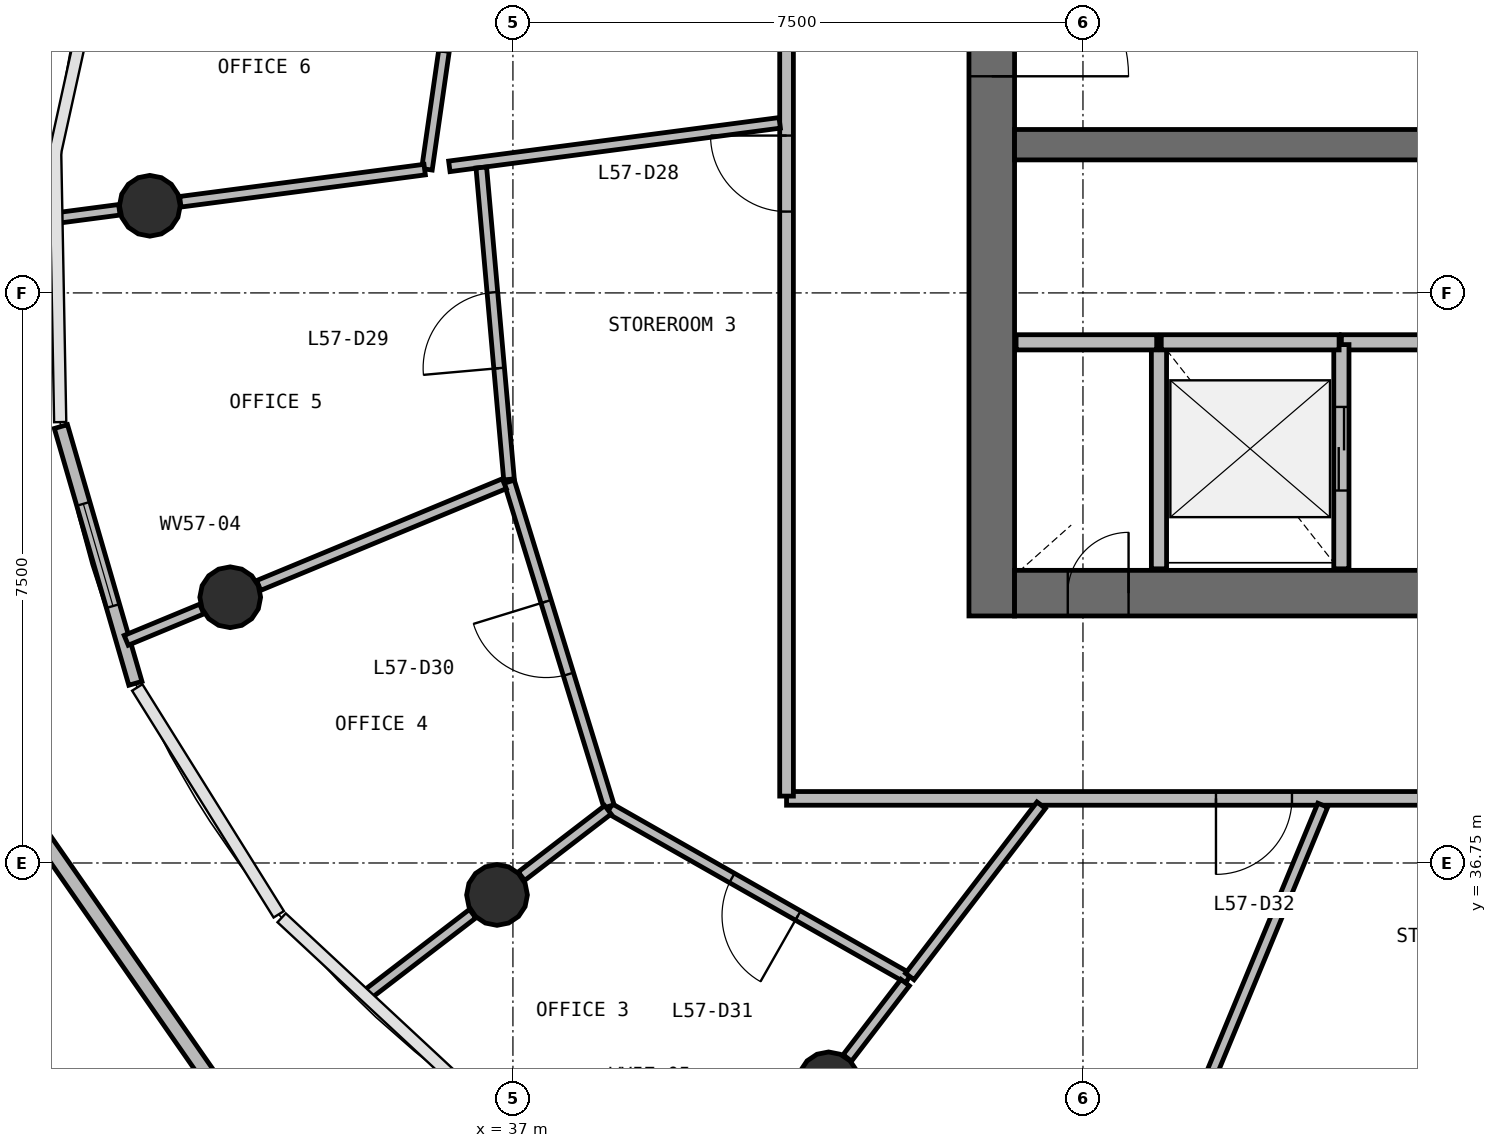
"""IFC4 building model, lengths in metres.
Left out: names, types, materials, properties, quantities, classifications, styles, units other than length and angle.
Written with IfcOpenShell. Run it as: python <this file> out.ifc"""

import sys

from ifc_helpers import new_model, si_unit, direction, frame, frame_2d, origin, origin_2d, place, context, subcontext, project, spatial, rectangle, circle, extrude, source, transform, mapped, element, fill, save


model = new_model("IFC4")
c1 = context("Model", 3, precision=1e-05, world=origin(), true_north=direction((0.0, 1.0)))
c2 = subcontext(c1, "Body", "Model", "MODEL_VIEW")
j1 = project(units=[si_unit("LENGTHUNIT", "METRE"), si_unit("PLANEANGLEUNIT", "RADIAN")], contexts=[c1])
p1 = place(None, origin())
s1 = spatial("IfcSite", under=j1, at=p1, CompositionType="ELEMENT")
p2 = place(p1, origin())
s2 = spatial("IfcBuilding", under=s1, at=p2, CompositionType="ELEMENT")
p3 = place(p2, frame((0.0, 0.0, 234.5)))
s3 = spatial("IfcBuildingStorey", under=s2, at=p3, CompositionType="ELEMENT", Elevation=234.5)
p4 = place(p3, frame((43.3, 56.0, 0.0), z_axis=(0.0, 0.0, 1.0), x_axis=(0.0, -1.0, 0.0)))
e1 = element("IfcWall", 1, at=p4, inside=s3, PredefinedType="SHEAR", context=c2, shape_type="SweptSolid", body=[
    extrude(rectangle(XDim=16.0, YDim=0.6, at=frame_2d((8.0, 0.0))), origin(), (0.0, 0.0, 1.0), 3.9),
])
p5 = place(p4, frame((7.1, 0.0, 0.0)))
e2 = element("IfcOpeningElement", 2, at=p5, cuts=e1, PredefinedType="OPENING", context=c2, shape_type="SweptSolid", body=[
    extrude(rectangle(XDim=1.8, YDim=2.1, at=frame_2d((0.9, 1.05))), frame((0.0, 0.31, 0.0), z_axis=(0.0, -1.0, 0.0), x_axis=(1.0, 0.0, 0.0)), (0.0, 0.0, 1.0), 0.62),
])
p6 = place(p3, frame((43.6, 40.3, 0.0), z_axis=(0.0, 0.0, 1.0), x_axis=(1.0, 0.0, 0.0)))
e3 = element("IfcWall", 3, at=p6, inside=s3, PredefinedType="SHEAR", context=c2, shape_type="SweptSolid", body=[
    extrude(rectangle(XDim=16.8, YDim=0.6, at=frame_2d((8.4, 0.0))), origin(), (0.0, 0.0, 1.0), 3.9),
])
p7 = place(p6, frame((10.3, 0.0, 0.0)))
e4 = element("IfcOpeningElement", 4, at=p7, cuts=e3, PredefinedType="OPENING", context=c2, shape_type="SweptSolid", body=[
    extrude(rectangle(XDim=1.2, YDim=2.1, at=frame_2d((0.6, 1.05))), frame((0.0, 0.31, 0.0), z_axis=(0.0, -1.0, 0.0), x_axis=(1.0, 0.0, 0.0)), (0.0, 0.0, 1.0), 0.62),
])
p8 = place(p6, frame((7.25, 0.0, 0.0)))
e5 = element("IfcOpeningElement", 5, at=p8, cuts=e3, PredefinedType="OPENING", context=c2, shape_type="SweptSolid", body=[
    extrude(rectangle(XDim=1.1, YDim=2.1, at=frame_2d((0.55, 1.05))), frame((0.0, 0.31, 0.0), z_axis=(0.0, -1.0, 0.0), x_axis=(1.0, 0.0, 0.0)), (0.0, 0.0, 1.0), 0.62),
])
p9 = place(p6, frame((0.7, 0.0, 0.0)))
e6 = element("IfcOpeningElement", 6, at=p9, cuts=e3, PredefinedType="OPENING", context=c2, shape_type="SweptSolid", body=[
    extrude(rectangle(XDim=0.8, YDim=2.1, at=frame_2d((0.4, 1.05))), frame((0.0, 0.31, 0.0), z_axis=(0.0, -1.0, 0.0), x_axis=(1.0, 0.0, 0.0)), (0.0, 0.0, 1.0), 0.62),
])
p10 = place(p3, frame((43.6, 46.2, 0.0), z_axis=(0.0, 0.0, 1.0), x_axis=(1.0, 0.0, 0.0)))
e7 = element("IfcWall", 7, at=p10, inside=s3, PredefinedType="SHEAR", context=c2, shape_type="SweptSolid", body=[
    extrude(rectangle(XDim=16.8, YDim=0.4, at=frame_2d((8.4, 0.0))), origin(), (0.0, 0.0, 1.0), 3.9),
])
p11 = place(p10, frame((9.8, 0.0, 0.0)))
e8 = element("IfcOpeningElement", 8, at=p11, cuts=e7, PredefinedType="OPENING", context=c2, shape_type="SweptSolid", body=[
    extrude(rectangle(XDim=1.1, YDim=2.1, at=frame_2d((0.55, 1.05))), frame((0.0, 0.21, 0.0), z_axis=(0.0, -1.0, 0.0), x_axis=(1.0, 0.0, 0.0)), (0.0, 0.0, 1.0), 0.42),
])
p12 = place(p10, frame((12.3, 0.0, 0.0)))
e9 = element("IfcOpeningElement", 9, at=p12, cuts=e7, PredefinedType="OPENING", context=c2, shape_type="SweptSolid", body=[
    extrude(rectangle(XDim=1.1, YDim=2.1, at=frame_2d((0.55, 1.05))), frame((0.0, 0.21, 0.0), z_axis=(0.0, -1.0, 0.0), x_axis=(1.0, 0.0, 0.0)), (0.0, 0.0, 1.0), 0.42),
])
p13 = place(p10, frame((14.8, 0.0, 0.0)))
e10 = element("IfcOpeningElement", 10, at=p13, cuts=e7, PredefinedType="OPENING", context=c2, shape_type="SweptSolid", body=[
    extrude(rectangle(XDim=1.1, YDim=2.1, at=frame_2d((0.55, 1.05))), frame((0.0, 0.21, 0.0), z_axis=(0.0, -1.0, 0.0), x_axis=(1.0, 0.0, 0.0)), (0.0, 0.0, 1.0), 0.42),
])
p14 = place(p10, frame((7.85, 0.0, 0.0)))
e11 = element("IfcOpeningElement", 11, at=p14, cuts=e7, PredefinedType="OPENING", context=c2, shape_type="SweptSolid", body=[
    extrude(rectangle(XDim=0.9, YDim=2.1, at=frame_2d((0.45, 1.05))), frame((0.0, 0.21, 0.0), z_axis=(0.0, -1.0, 0.0), x_axis=(1.0, 0.0, 0.0)), (0.0, 0.0, 1.0), 0.42),
])
m1 = source(origin(), c2, "Body", "SweptSolid", [
    extrude(circle(Radius=0.4, at=origin_2d()), origin(), (0.0, 0.0, 1.0), 4.22),
])
for number, where, z_axis, x_axis in (
    (12, (32.223, 45.396, -0.32), (0.0, 0.0, 1.0), (1.0, 0.0, 0.0)),
    (13, (33.281, 40.246, -0.32), (0.0, 0.0, 1.0), (1.0, 0.0, 0.0)),
    (14, (36.791, 36.329, -0.32), (0.0, 0.0, 1.0), (1.0, 0.0, 0.0)),
    (15, (41.153, 33.864, -0.32), (0.0, 0.0, 1.0), (1.0, 0.0, 0.0)),
):
    element("IfcColumn", number, at=place(p3, frame(where, z_axis=z_axis, x_axis=x_axis)), inside=s3, PredefinedType="COLUMN", context=c2, shape_type="MappedRepresentation", body=[
        mapped(m1, transform((0.0, 0.0, 0.0), scale=1.0)),
    ])
p15 = place(p3, frame((31.052, 42.492, 0.0), z_axis=(0.0, 0.0, 1.0), x_axis=(0.278669778919, -0.960386981543, 0.0)))
e16 = element("IfcWall", 16, at=p15, inside=s3, PredefinedType="STANDARD", context=c2, shape_type="SweptSolid", body=[
    extrude(rectangle(XDim=3.518, YDim=0.18, at=frame_2d((1.759, 0.0))), origin(), (0.0, 0.0, 1.0), 3.328),
])
p16 = place(p15, frame((1.059, 0.0, 0.9)))
e17 = element("IfcOpeningElement", 17, at=p16, cuts=e16, PredefinedType="OPENING", context=c2, shape_type="SweptSolid", body=[
    extrude(rectangle(XDim=1.4, YDim=2.0, at=frame_2d((0.7, 1.0))), frame((0.0, 0.1, 0.0), z_axis=(0.0, -1.0, 0.0), x_axis=(1.0, 0.0, 0.0)), (0.0, 0.0, 1.0), 0.2),
])
p17 = place(p3, frame((33.321, 33.477, 0.0), z_axis=(0.0, 0.0, 1.0), x_axis=(-0.57129566516, 0.820744334716, 0.0)))
e18 = element("IfcWall", 18, at=p17, inside=s3, PredefinedType="PARAPET", context=c2, shape_type="SweptSolid", body=[
    extrude(rectangle(XDim=5.662, YDim=0.2, at=frame_2d((2.831, 0.0))), origin(), (0.0, 0.0, 1.0), 1.1),
])
p18 = place(p3, frame((52.7, 43.6, 0.0), z_axis=(0.0, 0.0, 1.0), x_axis=(-1.0, 0.0, 0.0)))
e19 = element("IfcWall", 19, at=p18, inside=s3, PredefinedType="SOLIDWALL", context=c2, shape_type="SweptSolid", body=[
    extrude(rectangle(XDim=4.8, YDim=0.2, at=frame_2d((2.4, 0.0))), origin(), (0.0, 0.0, 1.0), 3.58),
])
p19 = place(p3, frame((45.5, 43.6, 0.0), z_axis=(0.0, 0.0, 1.0), x_axis=(0.0, -1.0, 0.0)))
e20 = element("IfcWall", 20, at=p19, inside=s3, PredefinedType="SOLIDWALL", context=c2, shape_type="SweptSolid", body=[
    extrude(rectangle(XDim=2.98, YDim=0.2, at=frame_2d((1.49, 0.0))), origin(), (0.0, 0.0, 1.0), 3.58),
])
p20 = place(p3, frame((47.9, 40.62, 0.0), z_axis=(0.0, 0.0, 1.0), x_axis=(0.0, 1.0, 0.0)))
e21 = element("IfcWall", 21, at=p20, inside=s3, PredefinedType="SOLIDWALL", context=c2, shape_type="SweptSolid", body=[
    extrude(rectangle(XDim=2.95, YDim=0.2, at=frame_2d((1.475, 0.0))), origin(), (0.0, 0.0, 1.0), 3.58),
])
p21 = place(p20, frame((1.03, 0.0, 0.0)))
e22 = element("IfcOpeningElement", 22, at=p21, cuts=e21, PredefinedType="OPENING", context=c2, shape_type="SweptSolid", body=[
    extrude(rectangle(XDim=1.1, YDim=2.1, at=frame_2d((0.55, 1.05))), frame((0.0, 0.11, 0.0), z_axis=(0.0, -1.0, 0.0), x_axis=(1.0, 0.0, 0.0)), (0.0, 0.0, 1.0), 0.22),
])
p22 = place(p3, frame((47.87, 43.6, 0.0), z_axis=(0.0, 0.0, 1.0), x_axis=(-1.0, 0.0, 0.0)))
e23 = element("IfcWall", 23, at=p22, inside=s3, PredefinedType="SOLIDWALL", context=c2, shape_type="SweptSolid", body=[
    extrude(rectangle(XDim=2.34, YDim=0.2, at=frame_2d((1.17, 0.0))), origin(), (0.0, 0.0, 1.0), 3.58),
])
p23 = place(p3, frame((45.47, 43.6, 0.0), z_axis=(0.0, 0.0, 1.0), x_axis=(-1.0, 0.0, 0.0)))
e24 = element("IfcWall", 24, at=p23, inside=s3, PredefinedType="SOLIDWALL", context=c2, shape_type="SweptSolid", body=[
    extrude(rectangle(XDim=1.85, YDim=0.2, at=frame_2d((0.925, 0.0))), origin(), (0.0, 0.0, 1.0), 3.58),
])
p24 = place(p3, frame((63.4, 37.6, 0.0), z_axis=(0.0, 0.0, 1.0), x_axis=(-1.0, 0.0, 0.0)))
e25 = element("IfcWall", 25, at=p24, inside=s3, PredefinedType="PARTITIONING", context=c2, shape_type="SweptSolid", body=[
    extrude(rectangle(XDim=22.8, YDim=0.18, at=frame_2d((11.4, 0.0))), origin(), (0.0, 0.0, 1.0), 2.88),
])
p25 = place(p24, frame((16.15, 0.0, 0.0)))
e26 = element("IfcOpeningElement", 26, at=p25, cuts=e25, PredefinedType="OPENING", context=c2, shape_type="SweptSolid", body=[
    extrude(rectangle(XDim=1.0, YDim=2.1, at=frame_2d((0.5, 1.05))), frame((0.0, 0.1, 0.0), z_axis=(0.0, -1.0, 0.0), x_axis=(1.0, 0.0, 0.0)), (0.0, 0.0, 1.0), 0.2),
])
p26 = place(p24, frame((10.95, 0.0, 0.0)))
e27 = element("IfcOpeningElement", 27, at=p26, cuts=e25, PredefinedType="OPENING", context=c2, shape_type="SweptSolid", body=[
    extrude(rectangle(XDim=1.0, YDim=2.1, at=frame_2d((0.5, 1.05))), frame((0.0, 0.1, 0.0), z_axis=(0.0, -1.0, 0.0), x_axis=(1.0, 0.0, 0.0)), (0.0, 0.0, 1.0), 0.2),
])
p27 = place(p24, frame((5.75, 0.0, 0.0)))
e28 = element("IfcOpeningElement", 28, at=p27, cuts=e25, PredefinedType="OPENING", context=c2, shape_type="SweptSolid", body=[
    extrude(rectangle(XDim=1.0, YDim=2.1, at=frame_2d((0.5, 1.05))), frame((0.0, 0.1, 0.0), z_axis=(0.0, -1.0, 0.0), x_axis=(1.0, 0.0, 0.0)), (0.0, 0.0, 1.0), 0.2),
])
p28 = place(p3, frame((40.6, 37.63, 0.0), z_axis=(0.0, 0.0, 1.0), x_axis=(0.0, 1.0, 0.0)))
e29 = element("IfcWall", 29, at=p28, inside=s3, PredefinedType="PARTITIONING", context=c2, shape_type="SweptSolid", body=[
    extrude(rectangle(XDim=20.74, YDim=0.18, at=frame_2d((10.37, 0.0))), origin(), (0.0, 0.0, 1.0), 2.88),
])
p29 = place(p28, frame((9.89, 0.0, 0.0)))
e30 = element("IfcOpeningElement", 30, at=p29, cuts=e29, PredefinedType="OPENING", context=c2, shape_type="SweptSolid", body=[
    extrude(rectangle(XDim=1.0, YDim=2.1, at=frame_2d((0.5, 1.05))), frame((0.0, 0.1, 0.0), z_axis=(0.0, -1.0, 0.0), x_axis=(1.0, 0.0, 0.0)), (0.0, 0.0, 1.0), 0.2),
])
p30 = place(p28, frame((7.69, 0.0, 0.0)))
e31 = element("IfcOpeningElement", 31, at=p30, cuts=e29, PredefinedType="OPENING", context=c2, shape_type="SweptSolid", body=[
    extrude(rectangle(XDim=1.0, YDim=2.1, at=frame_2d((0.5, 1.05))), frame((0.0, 0.1, 0.0), z_axis=(0.0, -1.0, 0.0), x_axis=(1.0, 0.0, 0.0)), (0.0, 0.0, 1.0), 0.2),
])
p31 = place(p3, frame((45.783, 32.992, 0.0), z_axis=(0.0, 0.0, 1.0), x_axis=(0.382689806821, 0.923876892099, 0.0)))
e32 = element("IfcWall", 32, at=p31, inside=s3, PredefinedType="PARTITIONING", context=c2, shape_type="SweptSolid", body=[
    extrude(rectangle(XDim=4.891, YDim=0.14, at=frame_2d((2.445, 0.0))), origin(), (0.0, 0.0, 1.0), 2.88),
])
p32 = place(p3, frame((42.203, 35.233, 0.0), z_axis=(0.0, 0.0, 1.0), x_axis=(-0.869307862445, 0.494271019068, 0.0)))
e33 = element("IfcWall", 33, at=p32, inside=s3, PredefinedType="PARTITIONING", context=c2, shape_type="SweptSolid", body=[
    extrude(rectangle(XDim=4.521, YDim=0.14, at=frame_2d((2.26, 0.0))), origin(), (0.0, 0.0, 1.0), 2.88),
])
p33 = place(p32, frame((1.671, 0.0, 0.0)))
e34 = element("IfcOpeningElement", 34, at=p33, cuts=e33, PredefinedType="OPENING", context=c2, shape_type="SweptSolid", body=[
    extrude(rectangle(XDim=1.0, YDim=2.1, at=frame_2d((0.5, 1.05))), frame((0.0, 0.08, 0.0), z_axis=(0.0, -1.0, 0.0), x_axis=(1.0, 0.0, 0.0)), (0.0, 0.0, 1.0), 0.16),
])
p34 = place(p3, frame((38.264, 37.496, 0.0), z_axis=(0.0, 0.0, 1.0), x_axis=(-0.293913060846, 0.955832157162, 0.0)))
e35 = element("IfcWall", 35, at=p34, inside=s3, PredefinedType="PARTITIONING", context=c2, shape_type="SweptSolid", body=[
    extrude(rectangle(XDim=4.468, YDim=0.14, at=frame_2d((2.234, 0.0))), origin(), (0.0, 0.0, 1.0), 2.88),
])
p35 = place(p34, frame((1.818, 0.0, 0.0)))
e36 = element("IfcOpeningElement", 36, at=p35, cuts=e35, PredefinedType="OPENING", context=c2, shape_type="SweptSolid", body=[
    extrude(rectangle(XDim=1.0, YDim=2.1, at=frame_2d((0.5, 1.05))), frame((0.0, 0.08, 0.0), z_axis=(0.0, -1.0, 0.0), x_axis=(1.0, 0.0, 0.0)), (0.0, 0.0, 1.0), 0.16),
])
p36 = place(p3, frame((36.164, 45.915, 0.0), z_axis=(0.0, 0.0, 1.0), x_axis=(0.991443487812, 0.130536625031, 0.0)))
e37 = element("IfcWall", 37, at=p36, inside=s3, PredefinedType="PARTITIONING", context=c2, shape_type="SweptSolid", body=[
    extrude(rectangle(XDim=4.384, YDim=0.14, at=frame_2d((2.192, 0.0))), origin(), (0.0, 0.0, 1.0), 2.88),
])
p37 = place(p3, frame((41.399, 34.185, 0.0), z_axis=(0.0, 0.0, 1.0), x_axis=(0.608870244727, 0.793269831196, 0.0)))
e38 = element("IfcWall", 38, at=p37, inside=s3, PredefinedType="PARTITIONING", context=c2, shape_type="SweptSolid", body=[
    extrude(rectangle(XDim=1.25, YDim=0.14, at=frame_2d((0.625, 0.0))), origin(), (0.0, 0.0, 1.0), 2.88),
])
p38 = place(p3, frame((42.221, 35.257, 0.0), z_axis=(0.0, 0.0, 1.0), x_axis=(0.608792367533, 0.793329599368, 0.0)))
e39 = element("IfcWall", 39, at=p38, inside=s3, PredefinedType="PARTITIONING", context=c2, shape_type="SweptSolid", body=[
    extrude(rectangle(XDim=2.841, YDim=0.14, at=frame_2d((1.42, 0.0))), origin(), (0.0, 0.0, 1.0), 2.88),
])
p39 = place(p3, frame((36.948, 41.796, 0.0), z_axis=(0.0, 0.0, 1.0), x_axis=(-0.088537177072, 0.996072872975, 0.0)))
e40 = element("IfcWall", 40, at=p39, inside=s3, PredefinedType="PARTITIONING", context=c2, shape_type="SweptSolid", body=[
    extrude(rectangle(XDim=4.12, YDim=0.14, at=frame_2d((2.06, 0.0))), origin(), (0.0, 0.0, 1.0), 2.88),
])
p40 = place(p39, frame((1.469, 0.0, 0.0)))
e41 = element("IfcOpeningElement", 41, at=p40, cuts=e40, PredefinedType="OPENING", context=c2, shape_type="SweptSolid", body=[
    extrude(rectangle(XDim=1.0, YDim=2.1, at=frame_2d((0.5, 1.05))), frame((0.0, 0.08, 0.0), z_axis=(0.0, -1.0, 0.0), x_axis=(1.0, 0.0, 0.0)), (0.0, 0.0, 1.0), 0.16),
])
p41 = place(p3, frame((35.868, 45.876, 0.0), z_axis=(0.0, 0.0, 1.0), x_axis=(0.142606161413, 0.989779512178, 0.0)))
e42 = element("IfcWall", 42, at=p41, inside=s3, PredefinedType="PARTITIONING", context=c2, shape_type="SweptSolid", body=[
    extrude(rectangle(XDim=4.211, YDim=0.14, at=frame_2d((2.106, 0.0))), origin(), (0.0, 0.0, 1.0), 2.88),
])
p42 = place(p41, frame((1.562, 0.0, 0.0)))
e43 = element("IfcOpeningElement", 43, at=p42, cuts=e42, PredefinedType="OPENING", context=c2, shape_type="SweptSolid", body=[
    extrude(rectangle(XDim=1.0, YDim=2.1, at=frame_2d((0.5, 1.05))), frame((0.0, 0.08, 0.0), z_axis=(0.0, -1.0, 0.0), x_axis=(1.0, 0.0, 0.0)), (0.0, 0.0, 1.0), 0.16),
])
p43 = place(p3, frame((36.886, 41.74, 0.0), z_axis=(0.0, 0.0, 1.0), x_axis=(-0.923892629166, -0.382651812714, 0.0)))
e44 = element("IfcWall", 44, at=p43, inside=s3, PredefinedType="PARTITIONING", context=c2, shape_type="SweptSolid", body=[
    extrude(rectangle(XDim=3.498, YDim=0.14, at=frame_2d((1.749, 0.0))), origin(), (0.0, 0.0, 1.0), 2.88),
])
p44 = place(p3, frame((35.839, 45.872, 0.0), z_axis=(0.0, 0.0, 1.0), x_axis=(-0.991450707373, -0.13048177976, 0.0)))
e45 = element("IfcWall", 45, at=p44, inside=s3, PredefinedType="PARTITIONING", context=c2, shape_type="SweptSolid", body=[
    extrude(rectangle(XDim=3.243, YDim=0.14, at=frame_2d((1.621, 0.0))), origin(), (0.0, 0.0, 1.0), 2.88),
])
p45 = place(p3, frame((36.469, 36.083, 0.0), z_axis=(0.0, 0.0, 1.0), x_axis=(-0.793354095368, -0.608760444973, 0.0)))
e46 = element("IfcWall", 46, at=p45, inside=s3, PredefinedType="PARTITIONING", context=c2, shape_type="SweptSolid", body=[
    extrude(rectangle(XDim=1.776, YDim=0.14, at=frame_2d((0.888, 0.0))), origin(), (0.0, 0.0, 1.0), 2.88),
])
p46 = place(p3, frame((38.25, 37.449, 0.0), z_axis=(0.0, 0.0, 1.0), x_axis=(-0.793313149545, -0.60881380303, 0.0)))
e47 = element("IfcWall", 47, at=p46, inside=s3, PredefinedType="PARTITIONING", context=c2, shape_type="SweptSolid", body=[
    extrude(rectangle(XDim=1.434, YDim=0.14, at=frame_2d((0.717, 0.0))), origin(), (0.0, 0.0, 1.0), 2.88),
])
p47 = place(p3, frame((32.906, 40.091, 0.0), z_axis=(0.0, 0.0, 1.0), x_axis=(-0.923853671478, -0.382745860457, 0.0)))
e48 = element("IfcWall", 48, at=p47, inside=s3, PredefinedType="PARTITIONING", context=c2, shape_type="SweptSolid", body=[
    extrude(rectangle(XDim=1.076, YDim=0.14, at=frame_2d((0.538, 0.0))), origin(), (0.0, 0.0, 1.0), 2.88),
])
p48 = place(p3, frame((31.822, 45.344, 0.0), z_axis=(0.0, 0.0, 1.0), x_axis=(-0.991435721486, -0.130595597787, 0.0)))
e49 = element("IfcWall", 49, at=p48, inside=s3, PredefinedType="PARTITIONING", context=c2, shape_type="SweptSolid", body=[
    extrude(rectangle(XDim=0.806, YDim=0.14, at=frame_2d((0.403, 0.0))), origin(), (0.0, 0.0, 1.0), 2.88),
])
m2 = source(origin(), c2, "Body", "SweptSolid", [
    extrude(rectangle(XDim=1.4, YDim=2.0, at=frame_2d((0.7, 1.0))), frame((0.0, 0.03, 0.0), z_axis=(0.0, -1.0, 0.0), x_axis=(1.0, 0.0, 0.0)), (0.0, 0.0, 1.0), 0.06),
])
p49 = place(p16, origin())
e50 = element("IfcWindow", 50, at=p49, inside=s3, PartitioningType="SINGLE_PANEL", PredefinedType="WINDOW", context=c2, shape_type="MappedRepresentation", body=[
    mapped(m2, transform((0.0, 0.0, 0.0), scale=1.0)),
])
fill(e17, e50)
m3 = source(origin(), c2, "Body", "SweptSolid", [
    extrude(rectangle(XDim=1.8, YDim=2.1, at=frame_2d((0.9, 1.05))), frame((0.0, 0.025, 0.0), z_axis=(0.0, -1.0, 0.0), x_axis=(1.0, 0.0, 0.0)), (0.0, 0.0, 1.0), 0.05),
])
p50 = place(p5, origin())
e51 = element("IfcDoor", 51, at=p50, inside=s3, OperationType="SINGLE_SWING_RIGHT", PredefinedType="DOOR", context=c2, shape_type="MappedRepresentation", body=[
    mapped(m3, transform((0.0, 0.0, 0.0), scale=1.0)),
])
fill(e2, e51)
m4 = source(origin(), c2, "Body", "SweptSolid", [
    extrude(rectangle(XDim=1.1, YDim=2.1, at=frame_2d((0.55, 1.05))), frame((0.0, 0.025, 0.0), z_axis=(0.0, -1.0, 0.0), x_axis=(1.0, 0.0, 0.0)), (0.0, 0.0, 1.0), 0.05),
])
p51 = place(p21, origin())
e52 = element("IfcDoor", 52, at=p51, inside=s3, OperationType="DOUBLE_DOOR_SLIDING", PredefinedType="USERDEFINED", context=c2, shape_type="MappedRepresentation", body=[
    mapped(m4, transform((0.0, 0.0, 0.0), scale=1.0)),
])
fill(e22, e52)
m5 = source(origin(), c2, "Body", "SweptSolid", [
    extrude(rectangle(XDim=0.8, YDim=2.1, at=frame_2d((0.4, 1.05))), frame((0.0, 0.025, 0.0), z_axis=(0.0, -1.0, 0.0), x_axis=(1.0, 0.0, 0.0)), (0.0, 0.0, 1.0), 0.05),
])
p52 = place(p9, origin())
e53 = element("IfcDoor", 53, at=p52, inside=s3, OperationType="SINGLE_SWING_RIGHT", PredefinedType="DOOR", context=c2, shape_type="MappedRepresentation", body=[
    mapped(m5, transform((0.0, 0.0, 0.0), scale=1.0)),
])
fill(e6, e53)
m6 = source(origin(), c2, "Body", "SweptSolid", [
    extrude(rectangle(XDim=1.0, YDim=2.1, at=frame_2d((0.5, 1.05))), frame((0.0, 0.025, 0.0), z_axis=(0.0, -1.0, 0.0), x_axis=(1.0, 0.0, 0.0)), (0.0, 0.0, 1.0), 0.05),
])
p53 = place(p30, origin())
e54 = element("IfcDoor", 54, at=p53, inside=s3, OperationType="SINGLE_SWING_RIGHT", PredefinedType="DOOR", context=c2, shape_type="MappedRepresentation", body=[
    mapped(m6, transform((0.0, 0.0, 0.0), scale=1.0)),
])
fill(e31, e54)
p54 = place(p40, origin())
e55 = element("IfcDoor", 55, at=p54, inside=s3, OperationType="SINGLE_SWING_LEFT", PredefinedType="DOOR", context=c2, shape_type="MappedRepresentation", body=[
    mapped(m6, transform((0.0, 0.0, 0.0), scale=1.0)),
])
fill(e41, e55)
p55 = place(p35, origin())
e56 = element("IfcDoor", 56, at=p55, inside=s3, OperationType="SINGLE_SWING_RIGHT", PredefinedType="DOOR", context=c2, shape_type="MappedRepresentation", body=[
    mapped(m6, transform((0.0, 0.0, 0.0), scale=1.0)),
])
fill(e36, e56)
p56 = place(p33, origin())
e57 = element("IfcDoor", 57, at=p56, inside=s3, OperationType="SINGLE_SWING_LEFT", PredefinedType="DOOR", context=c2, shape_type="MappedRepresentation", body=[
    mapped(m6, transform((0.0, 0.0, 0.0), scale=1.0)),
])
fill(e34, e57)
p57 = place(p25, origin())
e58 = element("IfcDoor", 58, at=p57, inside=s3, OperationType="SINGLE_SWING_RIGHT", PredefinedType="DOOR", context=c2, shape_type="MappedRepresentation", body=[
    mapped(m6, transform((0.0, 0.0, 0.0), scale=1.0)),
])
fill(e26, e58)
save(model, sys.argv[1])
